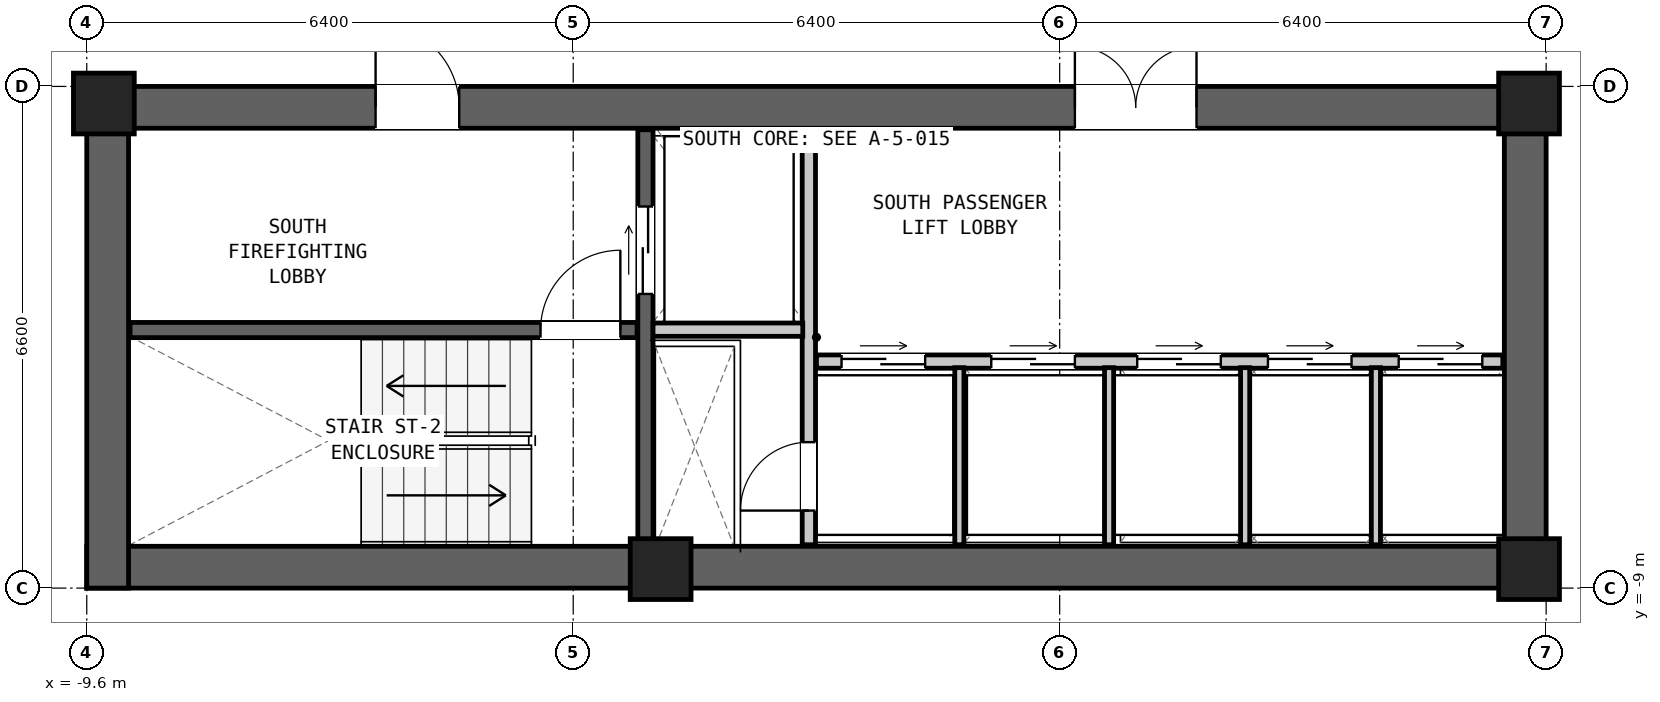
"""IFC4 building model, lengths in metres.
Left out: names, types, materials, properties, quantities, classifications, styles, units other than length and angle.
Written with IfcOpenShell. Run it as: python <this file> out.ifc"""

import sys

from ifc_helpers import new_model, si_unit, direction, frame, frame_2d, origin, origin_2d, place, context, subcontext, project, spatial, rectangle, extrude, element, fill, save


model = new_model("IFC4")
c1 = context("Model", 3, precision=1e-05, world=origin(), true_north=direction((0.0, 1.0)))
c2 = subcontext(c1, "Body", "Model", "MODEL_VIEW")
j1 = project(units=[si_unit("LENGTHUNIT", "METRE"), si_unit("PLANEANGLEUNIT", "RADIAN")], contexts=[c1])
p1 = place(None, origin())
s1 = spatial("IfcSite", under=j1, at=p1, CompositionType="ELEMENT")
p2 = place(p1, origin())
s2 = spatial("IfcBuilding", under=s1, at=p2, CompositionType="ELEMENT")
p3 = place(p2, frame((0.0, 0.0, 44.4)))
s3 = spatial("IfcBuildingStorey", under=s2, at=p3, CompositionType="ELEMENT", Elevation=44.4)
p4 = place(p3, frame((-9.6, -8.725, 0.0), z_axis=(0.0, 0.0, 1.0), x_axis=(1.0, 0.0, 0.0)))
e1 = element("IfcWall", 1, at=p4, inside=s3, PredefinedType="SHEAR", context=c2, shape_type="SweptSolid", body=[
    extrude(rectangle(XDim=19.2, YDim=0.55, at=frame_2d((9.6, 0.0))), origin(), (0.0, 0.0, 1.0), 3.05),
])
p5 = place(p3, frame((-9.6, -2.675, 0.0), z_axis=(0.0, 0.0, 1.0), x_axis=(1.0, 0.0, 0.0)))
e2 = element("IfcWall", 2, at=p5, inside=s3, PredefinedType="SHEAR", context=c2, shape_type="SweptSolid", body=[
    extrude(rectangle(XDim=19.2, YDim=0.55, at=frame_2d((9.6, 0.0))), origin(), (0.0, 0.0, 1.0), 3.05),
])
p6 = place(p5, frame((3.8, 0.0, 0.0)))
e3 = element("IfcOpeningElement", 3, at=p6, cuts=e2, PredefinedType="OPENING", context=c2, shape_type="SweptSolid", body=[
    extrude(rectangle(XDim=1.1, YDim=2.08, at=frame_2d((0.55, 1.04))), frame((0.0, 0.287, 0.0), z_axis=(0.0, -1.0, 0.0), x_axis=(1.0, 0.0, 0.0)), (0.0, 0.0, 1.0), 0.574),
])
p7 = place(p5, frame((13.0, 0.0, 0.0)))
e4 = element("IfcOpeningElement", 4, at=p7, cuts=e2, PredefinedType="OPENING", context=c2, shape_type="SweptSolid", body=[
    extrude(rectangle(XDim=1.6, YDim=2.12, at=frame_2d((0.8, 1.06))), frame((0.0, 0.287, 0.0), z_axis=(0.0, -1.0, 0.0), x_axis=(1.0, 0.0, 0.0)), (0.0, 0.0, 1.0), 0.574),
])
for number, where, z_axis, x_axis in (
    (5, (-9.325, -9.0, 0.0), (0.0, 0.0, 1.0), (0.0, 1.0, 0.0)),
    (6, (9.325, -9.0, 0.0), (0.0, 0.0, 1.0), (0.0, 1.0, 0.0)),
):
    element("IfcWall", number, at=place(p3, frame(where, z_axis=z_axis, x_axis=x_axis)), inside=s3, PredefinedType="SHEAR", context=c2, shape_type="SweptSolid", body=[
        extrude(rectangle(XDim=6.6, YDim=0.55, at=frame_2d((3.3, 0.0))), origin(), (0.0, 0.0, 1.0), 3.05),
    ])
for number, where, z_axis, x_axis in (
    (7, (-9.375, -2.625, 0.0), (0.0, 0.0, 1.0), (1.0, 0.0, 0.0)),
    (8, (9.375, -2.625, 0.0), (0.0, 0.0, 1.0), (1.0, 0.0, 0.0)),
    (9, (-2.05, -8.75, 0.0), (0.0, 0.0, 1.0), (1.0, 0.0, 0.0)),
    (10, (9.375, -8.75, 0.0), (0.0, 0.0, 1.0), (1.0, 0.0, 0.0)),
):
    element("IfcColumn", number, at=place(p3, frame(where, z_axis=z_axis, x_axis=x_axis)), inside=s3, PredefinedType="COLUMN", context=c2, shape_type="SweptSolid", body=[
        extrude(rectangle(XDim=0.8, YDim=0.8, at=origin_2d()), origin(), (0.0, 0.0, 1.0), 3.05),
    ])
p8 = place(p3, frame((-9.03, -5.605, 0.0), z_axis=(0.0, 0.0, 1.0), x_axis=(1.0, 0.0, 0.0)))
e11 = element("IfcWall", 11, at=p8, inside=s3, PredefinedType="SHEAR", context=c2, shape_type="SweptSolid", body=[
    extrude(rectangle(XDim=6.67, YDim=0.2, at=frame_2d((3.335, 0.0))), origin(), (0.0, 0.0, 1.0), 2.83),
])
p9 = place(p8, frame((5.4, 0.0, 0.0)))
e12 = element("IfcOpeningElement", 12, at=p9, cuts=e11, PredefinedType="OPENING", context=c2, shape_type="SweptSolid", body=[
    extrude(rectangle(XDim=1.05, YDim=2.08, at=frame_2d((0.525, 1.04))), frame((0.0, 0.112, 0.0), z_axis=(0.0, -1.0, 0.0), x_axis=(1.0, 0.0, 0.0)), (0.0, 0.0, 1.0), 0.224),
])
p10 = place(p3, frame((-2.25, -8.43, 0.0), z_axis=(0.0, 0.0, 1.0), x_axis=(0.0, 1.0, 0.0)))
e13 = element("IfcWall", 13, at=p10, inside=s3, PredefinedType="SHEAR", context=c2, shape_type="SweptSolid", body=[
    extrude(rectangle(XDim=5.46, YDim=0.2, at=frame_2d((2.73, 0.0))), origin(), (0.0, 0.0, 1.0), 2.83),
])
p11 = place(p10, frame((3.3, 0.0, 0.0)))
e14 = element("IfcOpeningElement", 14, at=p11, cuts=e13, PredefinedType="OPENING", context=c2, shape_type="SweptSolid", body=[
    extrude(rectangle(XDim=1.15, YDim=2.08, at=frame_2d((0.575, 1.04))), frame((0.0, 0.112, 0.0), z_axis=(0.0, -1.0, 0.0), x_axis=(1.0, 0.0, 0.0)), (0.0, 0.0, 1.0), 0.224),
])
p12 = place(p3, frame((-0.1, -8.43, 0.0), z_axis=(0.0, 0.0, 1.0), x_axis=(0.0, 1.0, 0.0)))
e15 = element("IfcWall", 15, at=p12, inside=s3, PredefinedType="PARTITIONING", context=c2, shape_type="SweptSolid", body=[
    extrude(rectangle(XDim=5.46, YDim=0.175, at=frame_2d((2.73, 0.0))), origin(), (0.0, 0.0, 1.0), 2.83),
])
p13 = place(p12, frame((0.45, 0.0, 0.0)))
e16 = element("IfcOpeningElement", 16, at=p13, cuts=e15, PredefinedType="OPENING", context=c2, shape_type="SweptSolid", body=[
    extrude(rectangle(XDim=0.9, YDim=2.05, at=frame_2d((0.45, 1.025))), frame((0.0, 0.1, 0.0), z_axis=(0.0, -1.0, 0.0), x_axis=(1.0, 0.0, 0.0)), (0.0, 0.0, 1.0), 0.199),
])
p14 = place(p3, frame((-2.15, -5.6, 0.0), z_axis=(0.0, 0.0, 1.0), x_axis=(1.0, 0.0, 0.0)))
e17 = element("IfcWall", 17, at=p14, inside=s3, PredefinedType="PARTITIONING", context=c2, shape_type="SweptSolid", body=[
    extrude(rectangle(XDim=1.97, YDim=0.175, at=frame_2d((0.985, 0.0))), origin(), (0.0, 0.0, 1.0), 2.83),
])
p15 = place(p3, frame((0.0, -6.02, 0.0), z_axis=(0.0, 0.0, 1.0), x_axis=(1.0, 0.0, 0.0)))
e18 = element("IfcWall", 18, at=p15, inside=s3, PredefinedType="PARTITIONING", context=c2, shape_type="SweptSolid", body=[
    extrude(rectangle(XDim=9.03, YDim=0.175, at=frame_2d((4.515, 0.0))), origin(), (0.0, 0.0, 1.0), 2.83),
])
p16 = place(p15, frame((0.33, 0.0, 0.0)))
e19 = element("IfcOpeningElement", 19, at=p16, cuts=e18, PredefinedType="OPENING", context=c2, shape_type="SweptSolid", body=[
    extrude(rectangle(XDim=1.1, YDim=2.06, at=frame_2d((0.55, 1.03))), frame((0.0, 0.1, 0.0), z_axis=(0.0, -1.0, 0.0), x_axis=(1.0, 0.0, 0.0)), (0.0, 0.0, 1.0), 0.199),
])
p17 = place(p15, frame((2.3, 0.0, 0.0)))
e20 = element("IfcOpeningElement", 20, at=p17, cuts=e18, PredefinedType="OPENING", context=c2, shape_type="SweptSolid", body=[
    extrude(rectangle(XDim=1.1, YDim=2.06, at=frame_2d((0.55, 1.03))), frame((0.0, 0.1, 0.0), z_axis=(0.0, -1.0, 0.0), x_axis=(1.0, 0.0, 0.0)), (0.0, 0.0, 1.0), 0.199),
])
p18 = place(p15, frame((4.22, 0.0, 0.0)))
e21 = element("IfcOpeningElement", 21, at=p18, cuts=e18, PredefinedType="OPENING", context=c2, shape_type="SweptSolid", body=[
    extrude(rectangle(XDim=1.1, YDim=2.06, at=frame_2d((0.55, 1.03))), frame((0.0, 0.1, 0.0), z_axis=(0.0, -1.0, 0.0), x_axis=(1.0, 0.0, 0.0)), (0.0, 0.0, 1.0), 0.199),
])
p19 = place(p15, frame((5.94, 0.0, 0.0)))
e22 = element("IfcOpeningElement", 22, at=p19, cuts=e18, PredefinedType="OPENING", context=c2, shape_type="SweptSolid", body=[
    extrude(rectangle(XDim=1.1, YDim=2.06, at=frame_2d((0.55, 1.03))), frame((0.0, 0.1, 0.0), z_axis=(0.0, -1.0, 0.0), x_axis=(1.0, 0.0, 0.0)), (0.0, 0.0, 1.0), 0.199),
])
p20 = place(p15, frame((7.66, 0.0, 0.0)))
e23 = element("IfcOpeningElement", 23, at=p20, cuts=e18, PredefinedType="OPENING", context=c2, shape_type="SweptSolid", body=[
    extrude(rectangle(XDim=1.1, YDim=2.06, at=frame_2d((0.55, 1.03))), frame((0.0, 0.1, 0.0), z_axis=(0.0, -1.0, 0.0), x_axis=(1.0, 0.0, 0.0)), (0.0, 0.0, 1.0), 0.199),
])
for number, where, z_axis, x_axis in (
    (24, (1.88, -8.43, 0.0), (0.0, 0.0, 1.0), (0.0, 1.0, 0.0)),
    (25, (3.85, -8.43, 0.0), (0.0, 0.0, 1.0), (0.0, 1.0, 0.0)),
    (26, (5.64, -8.43, 0.0), (0.0, 0.0, 1.0), (0.0, 1.0, 0.0)),
    (27, (7.36, -8.43, 0.0), (0.0, 0.0, 1.0), (0.0, 1.0, 0.0)),
):
    element("IfcWall", number, at=place(p3, frame(where, z_axis=z_axis, x_axis=x_axis)), inside=s3, PredefinedType="PARTITIONING", context=c2, shape_type="SweptSolid", body=[
        extrude(rectangle(XDim=2.33, YDim=0.12, at=frame_2d((1.165, 0.0))), origin(), (0.0, 0.0, 1.0), 2.83),
    ])
p21 = place(p9, origin())
e28 = element("IfcDoor", 28, at=p21, inside=s3, OperationType="SINGLE_SWING_RIGHT", PredefinedType="DOOR", context=c2, shape_type="SweptSolid", body=[
    extrude(rectangle(XDim=1.05, YDim=2.08, at=frame_2d((0.525, 1.04))), frame((0.0, 0.025, 0.0), z_axis=(0.0, -1.0, 0.0), x_axis=(1.0, 0.0, 0.0)), (0.0, 0.0, 1.0), 0.05),
])
fill(e12, e28)
p22 = place(p6, origin())
e29 = element("IfcDoor", 29, at=p22, inside=s3, OperationType="SINGLE_SWING_LEFT", PredefinedType="DOOR", context=c2, shape_type="SweptSolid", body=[
    extrude(rectangle(XDim=1.1, YDim=2.08, at=frame_2d((0.55, 1.04))), frame((0.0, 0.025, 0.0), z_axis=(0.0, -1.0, 0.0), x_axis=(1.0, 0.0, 0.0)), (0.0, 0.0, 1.0), 0.05),
])
fill(e3, e29)
p23 = place(p11, origin())
e30 = element("IfcDoor", 30, at=p23, inside=s3, OperationType="DOUBLE_DOOR_SLIDING", PredefinedType="DOOR", context=c2, shape_type="SweptSolid", body=[
    extrude(rectangle(XDim=1.15, YDim=2.08, at=frame_2d((0.575, 1.04))), frame((0.0, 0.025, 0.0), z_axis=(0.0, -1.0, 0.0), x_axis=(1.0, 0.0, 0.0)), (0.0, 0.0, 1.0), 0.05),
])
fill(e14, e30)
p24 = place(p13, origin())
e31 = element("IfcDoor", 31, at=p24, inside=s3, OperationType="SINGLE_SWING_LEFT", PredefinedType="DOOR", context=c2, shape_type="SweptSolid", body=[
    extrude(rectangle(XDim=0.9, YDim=2.05, at=frame_2d((0.45, 1.025))), frame((0.0, 0.025, 0.0), z_axis=(0.0, -1.0, 0.0), x_axis=(1.0, 0.0, 0.0)), (0.0, 0.0, 1.0), 0.05),
])
fill(e16, e31)
p25 = place(p7, origin())
e32 = element("IfcDoor", 32, at=p25, inside=s3, OperationType="DOUBLE_DOOR_SINGLE_SWING", PredefinedType="DOOR", context=c2, shape_type="SweptSolid", body=[
    extrude(rectangle(XDim=1.6, YDim=2.12, at=frame_2d((0.8, 1.06))), frame((0.0, 0.025, 0.0), z_axis=(0.0, -1.0, 0.0), x_axis=(1.0, 0.0, 0.0)), (0.0, 0.0, 1.0), 0.05),
])
fill(e4, e32)
p26 = place(p16, origin())
e33 = element("IfcDoor", 33, at=p26, inside=s3, OperationType="DOUBLE_DOOR_SLIDING", PredefinedType="DOOR", context=c2, shape_type="SweptSolid", body=[
    extrude(rectangle(XDim=1.1, YDim=2.06, at=frame_2d((0.55, 1.03))), frame((0.0, 0.025, 0.0), z_axis=(0.0, -1.0, 0.0), x_axis=(1.0, 0.0, 0.0)), (0.0, 0.0, 1.0), 0.05),
])
fill(e19, e33)
p27 = place(p17, origin())
e34 = element("IfcDoor", 34, at=p27, inside=s3, OperationType="DOUBLE_DOOR_SLIDING", PredefinedType="DOOR", context=c2, shape_type="SweptSolid", body=[
    extrude(rectangle(XDim=1.1, YDim=2.06, at=frame_2d((0.55, 1.03))), frame((0.0, 0.025, 0.0), z_axis=(0.0, -1.0, 0.0), x_axis=(1.0, 0.0, 0.0)), (0.0, 0.0, 1.0), 0.05),
])
fill(e20, e34)
p28 = place(p18, origin())
e35 = element("IfcDoor", 35, at=p28, inside=s3, OperationType="DOUBLE_DOOR_SLIDING", PredefinedType="DOOR", context=c2, shape_type="SweptSolid", body=[
    extrude(rectangle(XDim=1.1, YDim=2.06, at=frame_2d((0.55, 1.03))), frame((0.0, 0.025, 0.0), z_axis=(0.0, -1.0, 0.0), x_axis=(1.0, 0.0, 0.0)), (0.0, 0.0, 1.0), 0.05),
])
fill(e21, e35)
p29 = place(p19, origin())
e36 = element("IfcDoor", 36, at=p29, inside=s3, OperationType="DOUBLE_DOOR_SLIDING", PredefinedType="DOOR", context=c2, shape_type="SweptSolid", body=[
    extrude(rectangle(XDim=1.1, YDim=2.06, at=frame_2d((0.55, 1.03))), frame((0.0, 0.025, 0.0), z_axis=(0.0, -1.0, 0.0), x_axis=(1.0, 0.0, 0.0)), (0.0, 0.0, 1.0), 0.05),
])
fill(e22, e36)
p30 = place(p20, origin())
e37 = element("IfcDoor", 37, at=p30, inside=s3, OperationType="DOUBLE_DOOR_SLIDING", PredefinedType="DOOR", context=c2, shape_type="SweptSolid", body=[
    extrude(rectangle(XDim=1.1, YDim=2.06, at=frame_2d((0.55, 1.03))), frame((0.0, 0.025, 0.0), z_axis=(0.0, -1.0, 0.0), x_axis=(1.0, 0.0, 0.0)), (0.0, 0.0, 1.0), 0.05),
])
fill(e23, e37)
save(model, sys.argv[1])
